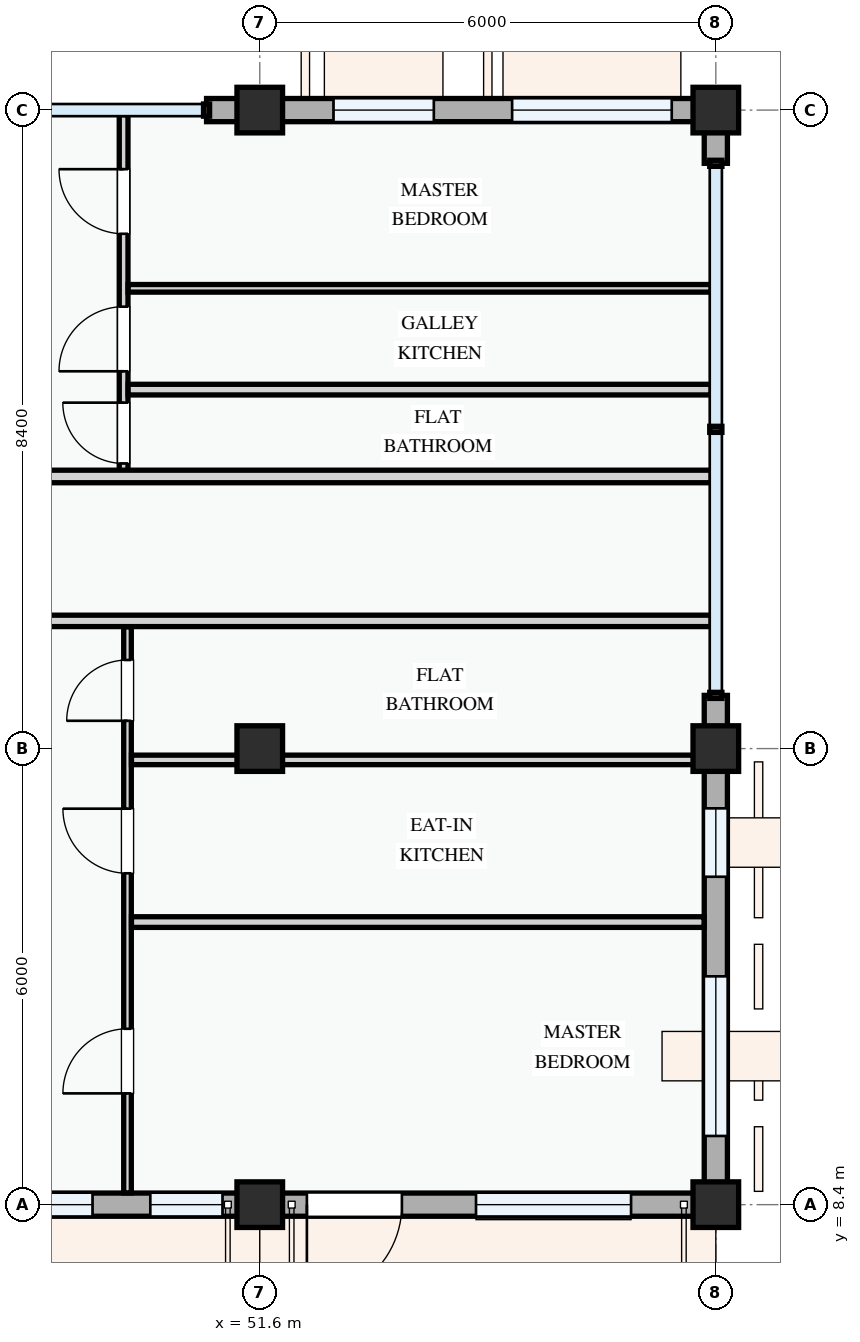
"""IFC4 building model, lengths in metres.
Left out: names, types, materials, properties, quantities, classifications, styles, units other than length and angle.
Written with IfcOpenShell. Run it as: python <this file> out.ifc"""

import sys

from ifc_helpers import new_model, si_unit, direction, frame, frame_2d, origin, origin_2d, place, context, subcontext, project, spatial, rectangle, extrude, element, fill, save


model = new_model("IFC4")
c1 = context("Model", 3, precision=1e-05, world=origin(), true_north=direction((0.0, 1.0)))
c2 = subcontext(c1, "Body", "Model", "MODEL_VIEW")
j1 = project(units=[si_unit("LENGTHUNIT", "METRE"), si_unit("PLANEANGLEUNIT", "RADIAN")], contexts=[c1])
p1 = place(None, origin())
s1 = spatial("IfcSite", under=j1, at=p1, CompositionType="ELEMENT")
p2 = place(p1, origin())
s2 = spatial("IfcBuilding", under=s1, at=p2, CompositionType="ELEMENT")
p3 = place(p2, frame((0.0, 0.0, 18.0)))
s3 = spatial("IfcBuildingStorey", under=s2, at=p3, CompositionType="ELEMENT", Elevation=18.0)
for number, where, z_axis, x_axis in (
    (1, (51.6, 8.4, 0.0), (0.0, 0.0, 1.0), (1.0, 0.0, 0.0)),
    (2, (51.6, 14.4, 0.0), (0.0, 0.0, 1.0), (1.0, 0.0, 0.0)),
    (3, (51.6, 22.8, 0.0), (0.0, 0.0, 1.0), (1.0, 0.0, 0.0)),
    (4, (57.6, 8.4, 0.0), (0.0, 0.0, 1.0), (1.0, 0.0, 0.0)),
    (5, (57.6, 14.4, 0.0), (0.0, 0.0, 1.0), (1.0, 0.0, 0.0)),
    (6, (57.6, 22.8, 0.0), (0.0, 0.0, 1.0), (1.0, 0.0, 0.0)),
):
    element("IfcColumn", number, at=place(p3, frame(where, z_axis=z_axis, x_axis=x_axis)), inside=s3, PredefinedType="COLUMN", context=c2, shape_type="SweptSolid", body=[
        extrude(rectangle(XDim=0.6, YDim=0.6, at=origin_2d()), origin(), (0.0, 0.0, 1.0), 3.3),
    ])
p4 = place(p3, frame((43.2, 8.4, 0.0), z_axis=(0.0, 0.0, 1.0), x_axis=(1.0, 0.0, 0.0)))
e7 = element("IfcWall", 7, at=p4, inside=s3, PredefinedType="STANDARD", context=c2, shape_type="SweptSolid", body=[
    extrude(rectangle(XDim=8.4, YDim=0.305, at=frame_2d((4.2, 0.0))), origin(), (0.0, 0.0, 1.0), 2.375),
])
p5 = place(p4, frame((2.11, 0.0, 0.0)))
e8 = element("IfcOpeningElement", 8, at=p5, cuts=e7, PredefinedType="OPENING", context=c2, shape_type="SweptSolid", body=[
    extrude(rectangle(XDim=1.2, YDim=2.15, at=frame_2d((0.6, 1.075))), frame((0.0, 0.163, 0.0), z_axis=(0.0, -1.0, 0.0), x_axis=(1.0, 0.0, 0.0)), (0.0, 0.0, 1.0), 0.325),
])
p6 = place(p4, frame((0.485, 0.0, 0.78)))
e9 = element("IfcOpeningElement", 9, at=p6, cuts=e7, PredefinedType="OPENING", context=c2, shape_type="SweptSolid", body=[
    extrude(rectangle(XDim=1.0, YDim=1.25, at=frame_2d((0.5, 0.625))), frame((0.0, 0.163, 0.0), z_axis=(0.0, -1.0, 0.0), x_axis=(1.0, 0.0, 0.0)), (0.0, 0.0, 1.0), 0.325),
])
p7 = place(p4, frame((3.82, 0.0, 0.78)))
e10 = element("IfcOpeningElement", 10, at=p7, cuts=e7, PredefinedType="OPENING", context=c2, shape_type="SweptSolid", body=[
    extrude(rectangle(XDim=2.38, YDim=1.48, at=frame_2d((1.19, 0.74))), frame((0.0, 0.163, 0.0), z_axis=(0.0, -1.0, 0.0), x_axis=(1.0, 0.0, 0.0)), (0.0, 0.0, 1.0), 0.325),
])
p8 = place(p4, frame((6.96, 0.0, 0.78)))
e11 = element("IfcOpeningElement", 11, at=p8, cuts=e7, PredefinedType="OPENING", context=c2, shape_type="SweptSolid", body=[
    extrude(rectangle(XDim=0.95, YDim=1.15, at=frame_2d((0.475, 0.575))), frame((0.0, 0.163, 0.0), z_axis=(0.0, -1.0, 0.0), x_axis=(1.0, 0.0, 0.0)), (0.0, 0.0, 1.0), 0.325),
])
p9 = place(p3, frame((51.6, 8.4, 0.0), z_axis=(0.0, 0.0, 1.0), x_axis=(1.0, 0.0, 0.0)))
e12 = element("IfcWall", 12, at=p9, inside=s3, PredefinedType="STANDARD", context=c2, shape_type="SweptSolid", body=[
    extrude(rectangle(XDim=6.0, YDim=0.305, at=frame_2d((3.0, 0.0))), origin(), (0.0, 0.0, 1.0), 2.475),
])
p10 = place(p9, frame((0.62, 0.0, 0.0)))
e13 = element("IfcOpeningElement", 13, at=p10, cuts=e12, PredefinedType="OPENING", context=c2, shape_type="SweptSolid", body=[
    extrude(rectangle(XDim=1.25, YDim=2.2, at=frame_2d((0.625, 1.1))), frame((0.0, 0.163, 0.0), z_axis=(0.0, -1.0, 0.0), x_axis=(1.0, 0.0, 0.0)), (0.0, 0.0, 1.0), 0.325),
])
p11 = place(p9, frame((2.845, 0.0, 0.78)))
e14 = element("IfcOpeningElement", 14, at=p11, cuts=e12, PredefinedType="OPENING", context=c2, shape_type="SweptSolid", body=[
    extrude(rectangle(XDim=2.04, YDim=1.46, at=frame_2d((1.02, 0.73))), frame((0.0, 0.163, 0.0), z_axis=(0.0, -1.0, 0.0), x_axis=(1.0, 0.0, 0.0)), (0.0, 0.0, 1.0), 0.325),
])
p12 = place(p3, frame((57.6, 8.4, 0.0), z_axis=(0.0, 0.0, 1.0), x_axis=(0.0, 1.0, 0.0)))
e15 = element("IfcWall", 15, at=p12, inside=s3, PredefinedType="STANDARD", context=c2, shape_type="SweptSolid", body=[
    extrude(rectangle(XDim=6.0, YDim=0.305, at=frame_2d((3.0, 0.0))), origin(), (0.0, 0.0, 1.0), 2.575),
])
p13 = place(p12, frame((0.904, 0.0, 0.78)))
e16 = element("IfcOpeningElement", 16, at=p13, cuts=e15, PredefinedType="OPENING", context=c2, shape_type="SweptSolid", body=[
    extrude(rectangle(XDim=2.1, YDim=1.55, at=frame_2d((1.05, 0.775))), frame((0.0, 0.163, 0.0), z_axis=(0.0, -1.0, 0.0), x_axis=(1.0, 0.0, 0.0)), (0.0, 0.0, 1.0), 0.325),
])
p14 = place(p12, frame((4.314, 0.0, 0.78)))
e17 = element("IfcOpeningElement", 17, at=p14, cuts=e15, PredefinedType="OPENING", context=c2, shape_type="SweptSolid", body=[
    extrude(rectangle(XDim=0.9, YDim=1.2, at=frame_2d((0.45, 0.6))), frame((0.0, 0.163, 0.0), z_axis=(0.0, -1.0, 0.0), x_axis=(1.0, 0.0, 0.0)), (0.0, 0.0, 1.0), 0.325),
])
p15 = place(p3, frame((57.6, 14.4, 0.0), z_axis=(0.0, 0.0, 1.0), x_axis=(0.0, 1.0, 0.0)))
e18 = element("IfcWall", 18, at=p15, inside=s3, PredefinedType="STANDARD", context=c2, shape_type="SweptSolid", body=[
    extrude(rectangle(XDim=0.7, YDim=0.305, at=frame_2d((0.35, 0.0))), origin(), (0.0, 0.0, 1.0), 2.425),
])
p16 = place(p3, frame((57.6, 22.1, 0.0), z_axis=(0.0, 0.0, 1.0), x_axis=(0.0, 1.0, 0.0)))
e19 = element("IfcWall", 19, at=p16, inside=s3, PredefinedType="STANDARD", context=c2, shape_type="SweptSolid", body=[
    extrude(rectangle(XDim=0.545, YDim=0.305, at=frame_2d((0.273, 0.0))), origin(), (0.0, 0.0, 1.0), 2.425),
])
p17 = place(p3, frame((57.6, 22.8, 0.0), z_axis=(0.0, 0.0, 1.0), x_axis=(-1.0, 0.0, 0.0)))
e20 = element("IfcWall", 20, at=p17, inside=s3, PredefinedType="STANDARD", context=c2, shape_type="SweptSolid", body=[
    extrude(rectangle(XDim=6.0, YDim=0.305, at=frame_2d((3.0, 0.0))), origin(), (0.0, 0.0, 1.0), 2.475),
])
p18 = place(p17, frame((0.58, 0.0, 0.78)))
e21 = element("IfcOpeningElement", 21, at=p18, cuts=e20, PredefinedType="OPENING", context=c2, shape_type="SweptSolid", body=[
    extrude(rectangle(XDim=2.1, YDim=1.55, at=frame_2d((1.05, 0.775))), frame((0.0, 0.163, 0.0), z_axis=(0.0, -1.0, 0.0), x_axis=(1.0, 0.0, 0.0)), (0.0, 0.0, 1.0), 0.325),
])
p19 = place(p17, frame((3.71, 0.0, 0.78)))
e22 = element("IfcOpeningElement", 22, at=p19, cuts=e20, PredefinedType="OPENING", context=c2, shape_type="SweptSolid", body=[
    extrude(rectangle(XDim=1.32, YDim=1.35, at=frame_2d((0.66, 0.675))), frame((0.0, 0.163, 0.0), z_axis=(0.0, -1.0, 0.0), x_axis=(1.0, 0.0, 0.0)), (0.0, 0.0, 1.0), 0.325),
])
p20 = place(p3, frame((51.6, 22.8, 0.0), z_axis=(0.0, 0.0, 1.0), x_axis=(-1.0, 0.0, 0.0)))
e23 = element("IfcWall", 23, at=p20, inside=s3, PredefinedType="STANDARD", context=c2, shape_type="SweptSolid", body=[
    extrude(rectangle(XDim=0.7, YDim=0.305, at=frame_2d((0.35, 0.0))), origin(), (0.0, 0.0, 1.0), 2.375),
])
p21 = place(p3, frame((49.86, 8.554, 0.0), z_axis=(0.0, 0.0, 1.0), x_axis=(0.0, 1.0, 0.0)))
e24 = element("IfcWall", 24, at=p21, inside=s3, PredefinedType="PARTITIONING", context=c2, shape_type="SweptSolid", body=[
    extrude(rectangle(XDim=7.448, YDim=0.1, at=frame_2d((3.724, 0.0))), origin(), (0.0, 0.0, 1.0), 3.0),
])
p22 = place(p21, frame((1.309, 0.0, 0.0)))
e25 = element("IfcOpeningElement", 25, at=p22, cuts=e24, PredefinedType="OPENING", context=c2, shape_type="SweptSolid", body=[
    extrude(rectangle(XDim=0.85, YDim=2.1, at=frame_2d((0.425, 1.05))), frame((0.0, 0.06, 0.0), z_axis=(0.0, -1.0, 0.0), x_axis=(1.0, 0.0, 0.0)), (0.0, 0.0, 1.0), 0.12),
])
p23 = place(p21, frame((4.205, 0.0, 0.0)))
e26 = element("IfcOpeningElement", 26, at=p23, cuts=e24, PredefinedType="OPENING", context=c2, shape_type="SweptSolid", body=[
    extrude(rectangle(XDim=0.85, YDim=2.1, at=frame_2d((0.425, 1.05))), frame((0.0, 0.06, 0.0), z_axis=(0.0, -1.0, 0.0), x_axis=(1.0, 0.0, 0.0)), (0.0, 0.0, 1.0), 0.12),
])
p24 = place(p21, frame((6.211, 0.0, 0.0)))
e27 = element("IfcOpeningElement", 27, at=p24, cuts=e24, PredefinedType="OPENING", context=c2, shape_type="SweptSolid", body=[
    extrude(rectangle(XDim=0.8, YDim=2.1, at=frame_2d((0.4, 1.05))), frame((0.0, 0.06, 0.0), z_axis=(0.0, -1.0, 0.0), x_axis=(1.0, 0.0, 0.0)), (0.0, 0.0, 1.0), 0.12),
])
p25 = place(p3, frame((49.912, 12.118, 0.0), z_axis=(0.0, 0.0, 1.0), x_axis=(1.0, 0.0, 0.0)))
e28 = element("IfcWall", 28, at=p25, inside=s3, PredefinedType="PARTITIONING", context=c2, shape_type="SweptSolid", body=[
    extrude(rectangle(XDim=7.533, YDim=0.14, at=frame_2d((3.767, 0.0))), origin(), (0.0, 0.0, 1.0), 3.0),
])
p26 = place(p3, frame((49.912, 14.251, 0.0), z_axis=(0.0, 0.0, 1.0), x_axis=(1.0, 0.0, 0.0)))
e29 = element("IfcWall", 29, at=p26, inside=s3, PredefinedType="PARTITIONING", context=c2, shape_type="SweptSolid", body=[
    extrude(rectangle(XDim=7.533, YDim=0.125, at=frame_2d((3.767, 0.0))), origin(), (0.0, 0.0, 1.0), 2.375),
])
p27 = place(p3, frame((49.809, 17.98, 0.0), z_axis=(0.0, 0.0, 1.0), x_axis=(0.0, 1.0, 0.0)))
e30 = element("IfcWall", 30, at=p27, inside=s3, PredefinedType="PARTITIONING", context=c2, shape_type="SweptSolid", body=[
    extrude(rectangle(XDim=4.76, YDim=0.115, at=frame_2d((2.38, 0.0))), origin(), (0.0, 0.0, 1.0), 3.0),
])
p28 = place(p27, frame((0.171, 0.0, 0.0)))
e31 = element("IfcOpeningElement", 31, at=p28, cuts=e30, PredefinedType="OPENING", context=c2, shape_type="SweptSolid", body=[
    extrude(rectangle(XDim=0.8, YDim=2.1, at=frame_2d((0.4, 1.05))), frame((0.0, 0.067, 0.0), z_axis=(0.0, -1.0, 0.0), x_axis=(1.0, 0.0, 0.0)), (0.0, 0.0, 1.0), 0.135),
])
p29 = place(p27, frame((1.384, 0.0, 0.0)))
e32 = element("IfcOpeningElement", 32, at=p29, cuts=e30, PredefinedType="OPENING", context=c2, shape_type="SweptSolid", body=[
    extrude(rectangle(XDim=0.85, YDim=2.1, at=frame_2d((0.425, 1.05))), frame((0.0, 0.067, 0.0), z_axis=(0.0, -1.0, 0.0), x_axis=(1.0, 0.0, 0.0)), (0.0, 0.0, 1.0), 0.135),
])
p30 = place(p27, frame((3.193, 0.0, 0.0)))
e33 = element("IfcOpeningElement", 33, at=p30, cuts=e30, PredefinedType="OPENING", context=c2, shape_type="SweptSolid", body=[
    extrude(rectangle(XDim=0.85, YDim=2.1, at=frame_2d((0.425, 1.05))), frame((0.0, 0.067, 0.0), z_axis=(0.0, -1.0, 0.0), x_axis=(1.0, 0.0, 0.0)), (0.0, 0.0, 1.0), 0.135),
])
p31 = place(p3, frame((49.868, 20.455, 0.0), z_axis=(0.0, 0.0, 1.0), x_axis=(1.0, 0.0, 0.0)))
e34 = element("IfcWall", 34, at=p31, inside=s3, PredefinedType="PARTITIONING", context=c2, shape_type="SweptSolid", body=[
    extrude(rectangle(XDim=7.672, YDim=0.1, at=frame_2d((3.836, 0.0))), origin(), (0.0, 0.0, 1.0), 3.0),
])
p32 = place(p3, frame((49.868, 19.122, 0.0), z_axis=(0.0, 0.0, 1.0), x_axis=(1.0, 0.0, 0.0)))
e35 = element("IfcWall", 35, at=p32, inside=s3, PredefinedType="PARTITIONING", context=c2, shape_type="SweptSolid", body=[
    extrude(rectangle(XDim=7.672, YDim=0.14, at=frame_2d((3.836, 0.0))), origin(), (0.0, 0.0, 1.0), 3.0),
])
p33 = place(p3, frame((22.66, 16.08, 0.0), z_axis=(0.0, 0.0, 1.0), x_axis=(1.0, 0.0, 0.0)))
e36 = element("IfcWall", 36, at=p33, inside=s3, PredefinedType="PARTITIONING", context=c2, shape_type="SweptSolid", body=[
    extrude(rectangle(XDim=34.88, YDim=0.15, at=frame_2d((17.44, 0.0))), origin(), (0.0, 0.0, 1.0), 3.0),
])
p34 = place(p33, frame((2.672, 0.0, 0.0)))
e37 = element("IfcOpeningElement", 37, at=p34, cuts=e36, PredefinedType="OPENING", context=c2, shape_type="SweptSolid", body=[
    extrude(rectangle(XDim=0.92, YDim=2.1, at=frame_2d((0.46, 1.05))), frame((0.0, 0.085, 0.0), z_axis=(0.0, -1.0, 0.0), x_axis=(1.0, 0.0, 0.0)), (0.0, 0.0, 1.0), 0.17),
])
p35 = place(p33, frame((10.71, 0.0, 0.0)))
e38 = element("IfcOpeningElement", 38, at=p35, cuts=e36, PredefinedType="OPENING", context=c2, shape_type="SweptSolid", body=[
    extrude(rectangle(XDim=0.92, YDim=2.1, at=frame_2d((0.46, 1.05))), frame((0.0, 0.085, 0.0), z_axis=(0.0, -1.0, 0.0), x_axis=(1.0, 0.0, 0.0)), (0.0, 0.0, 1.0), 0.17),
])
p36 = place(p33, frame((24.28, 0.0, 0.0)))
e39 = element("IfcOpeningElement", 39, at=p36, cuts=e36, PredefinedType="OPENING", context=c2, shape_type="SweptSolid", body=[
    extrude(rectangle(XDim=0.96, YDim=2.12, at=frame_2d((0.48, 1.06))), frame((0.0, 0.085, 0.0), z_axis=(0.0, -1.0, 0.0), x_axis=(1.0, 0.0, 0.0)), (0.0, 0.0, 1.0), 0.17),
])
p37 = place(p3, frame((22.66, 17.98, 0.0), z_axis=(0.0, 0.0, 1.0), x_axis=(1.0, 0.0, 0.0)))
e40 = element("IfcWall", 40, at=p37, inside=s3, PredefinedType="PARTITIONING", context=c2, shape_type="SweptSolid", body=[
    extrude(rectangle(XDim=34.88, YDim=0.165, at=frame_2d((17.44, 0.0))), origin(), (0.0, 0.0, 1.0), 3.0),
])
p38 = place(p37, frame((2.664, 0.0, 0.0)))
e41 = element("IfcOpeningElement", 41, at=p38, cuts=e40, PredefinedType="OPENING", context=c2, shape_type="SweptSolid", body=[
    extrude(rectangle(XDim=0.92, YDim=2.1, at=frame_2d((0.46, 1.05))), frame((0.0, 0.093, 0.0), z_axis=(0.0, -1.0, 0.0), x_axis=(1.0, 0.0, 0.0)), (0.0, 0.0, 1.0), 0.185),
])
p39 = place(p37, frame((10.71, 0.0, 0.0)))
e42 = element("IfcOpeningElement", 42, at=p39, cuts=e40, PredefinedType="OPENING", context=c2, shape_type="SweptSolid", body=[
    extrude(rectangle(XDim=0.92, YDim=2.1, at=frame_2d((0.46, 1.05))), frame((0.0, 0.093, 0.0), z_axis=(0.0, -1.0, 0.0), x_axis=(1.0, 0.0, 0.0)), (0.0, 0.0, 1.0), 0.185),
])
p40 = place(p37, frame((24.254, 0.0, 0.0)))
e43 = element("IfcOpeningElement", 43, at=p40, cuts=e40, PredefinedType="OPENING", context=c2, shape_type="SweptSolid", body=[
    extrude(rectangle(XDim=0.92, YDim=2.1, at=frame_2d((0.46, 1.05))), frame((0.0, 0.093, 0.0), z_axis=(0.0, -1.0, 0.0), x_axis=(1.0, 0.0, 0.0)), (0.0, 0.0, 1.0), 0.185),
])
p41 = place(p7, origin())
e44 = element("IfcWindow", 44, at=p41, inside=s3, PartitioningType="DOUBLE_PANEL_VERTICAL", PredefinedType="WINDOW", context=c2, shape_type="SweptSolid", body=[
    extrude(rectangle(XDim=2.38, YDim=1.48, at=frame_2d((1.19, 0.74))), frame((0.0, 0.03, 0.0), z_axis=(0.0, -1.0, 0.0), x_axis=(1.0, 0.0, 0.0)), (0.0, 0.0, 1.0), 0.06),
])
fill(e10, e44)
p42 = place(p8, origin())
e45 = element("IfcWindow", 45, at=p42, inside=s3, PartitioningType="SINGLE_PANEL", PredefinedType="WINDOW", context=c2, shape_type="SweptSolid", body=[
    extrude(rectangle(XDim=0.95, YDim=1.15, at=frame_2d((0.475, 0.575))), frame((0.0, 0.03, 0.0), z_axis=(0.0, -1.0, 0.0), x_axis=(1.0, 0.0, 0.0)), (0.0, 0.0, 1.0), 0.06),
])
fill(e11, e45)
p43 = place(p10, frame((1.25, 0.0, 0.0), z_axis=(0.0, 0.0, 1.0), x_axis=(-1.0, 0.0, 0.0)))
e46 = element("IfcDoor", 46, at=p43, inside=s3, OperationType="SINGLE_SWING_RIGHT", PredefinedType="DOOR", context=c2, shape_type="SweptSolid", body=[
    extrude(rectangle(XDim=1.25, YDim=2.2, at=frame_2d((0.625, 1.1))), frame((0.0, 0.025, 0.0), z_axis=(0.0, -1.0, 0.0), x_axis=(1.0, 0.0, 0.0)), (0.0, 0.0, 1.0), 0.05),
])
fill(e13, e46)
p44 = place(p11, origin())
e47 = element("IfcWindow", 47, at=p44, inside=s3, PartitioningType="DOUBLE_PANEL_VERTICAL", PredefinedType="WINDOW", context=c2, shape_type="SweptSolid", body=[
    extrude(rectangle(XDim=2.04, YDim=1.46, at=frame_2d((1.02, 0.73))), frame((0.0, 0.03, 0.0), z_axis=(0.0, -1.0, 0.0), x_axis=(1.0, 0.0, 0.0)), (0.0, 0.0, 1.0), 0.06),
])
fill(e14, e47)
p45 = place(p13, origin())
e48 = element("IfcWindow", 48, at=p45, inside=s3, PartitioningType="DOUBLE_PANEL_VERTICAL", PredefinedType="WINDOW", context=c2, shape_type="SweptSolid", body=[
    extrude(rectangle(XDim=2.1, YDim=1.55, at=frame_2d((1.05, 0.775))), frame((0.0, 0.03, 0.0), z_axis=(0.0, -1.0, 0.0), x_axis=(1.0, 0.0, 0.0)), (0.0, 0.0, 1.0), 0.06),
])
fill(e16, e48)
p46 = place(p14, origin())
e49 = element("IfcWindow", 49, at=p46, inside=s3, PartitioningType="SINGLE_PANEL", PredefinedType="WINDOW", context=c2, shape_type="SweptSolid", body=[
    extrude(rectangle(XDim=0.9, YDim=1.2, at=frame_2d((0.45, 0.6))), frame((0.0, 0.03, 0.0), z_axis=(0.0, -1.0, 0.0), x_axis=(1.0, 0.0, 0.0)), (0.0, 0.0, 1.0), 0.06),
])
fill(e17, e49)
p47 = place(p18, origin())
e50 = element("IfcWindow", 50, at=p47, inside=s3, PartitioningType="DOUBLE_PANEL_VERTICAL", PredefinedType="WINDOW", context=c2, shape_type="SweptSolid", body=[
    extrude(rectangle(XDim=2.1, YDim=1.55, at=frame_2d((1.05, 0.775))), frame((0.0, 0.03, 0.0), z_axis=(0.0, -1.0, 0.0), x_axis=(1.0, 0.0, 0.0)), (0.0, 0.0, 1.0), 0.06),
])
fill(e21, e50)
p48 = place(p19, origin())
e51 = element("IfcWindow", 51, at=p48, inside=s3, PartitioningType="SINGLE_PANEL", PredefinedType="WINDOW", context=c2, shape_type="SweptSolid", body=[
    extrude(rectangle(XDim=1.32, YDim=1.35, at=frame_2d((0.66, 0.675))), frame((0.0, 0.03, 0.0), z_axis=(0.0, -1.0, 0.0), x_axis=(1.0, 0.0, 0.0)), (0.0, 0.0, 1.0), 0.06),
])
fill(e22, e51)
p49 = place(p22, origin())
e52 = element("IfcDoor", 52, at=p49, inside=s3, OperationType="SINGLE_SWING_LEFT", PredefinedType="DOOR", context=c2, shape_type="SweptSolid", body=[
    extrude(rectangle(XDim=0.85, YDim=2.1, at=frame_2d((0.425, 1.05))), frame((0.0, 0.025, 0.0), z_axis=(0.0, -1.0, 0.0), x_axis=(1.0, 0.0, 0.0)), (0.0, 0.0, 1.0), 0.05),
])
fill(e25, e52)
p50 = place(p23, origin())
e53 = element("IfcDoor", 53, at=p50, inside=s3, OperationType="SINGLE_SWING_RIGHT", PredefinedType="DOOR", context=c2, shape_type="SweptSolid", body=[
    extrude(rectangle(XDim=0.85, YDim=2.1, at=frame_2d((0.425, 1.05))), frame((0.0, 0.025, 0.0), z_axis=(0.0, -1.0, 0.0), x_axis=(1.0, 0.0, 0.0)), (0.0, 0.0, 1.0), 0.05),
])
fill(e26, e53)
p51 = place(p24, origin())
e54 = element("IfcDoor", 54, at=p51, inside=s3, OperationType="SINGLE_SWING_LEFT", PredefinedType="DOOR", context=c2, shape_type="SweptSolid", body=[
    extrude(rectangle(XDim=0.8, YDim=2.1, at=frame_2d((0.4, 1.05))), frame((0.0, 0.025, 0.0), z_axis=(0.0, -1.0, 0.0), x_axis=(1.0, 0.0, 0.0)), (0.0, 0.0, 1.0), 0.05),
])
fill(e27, e54)
p52 = place(p28, origin())
e55 = element("IfcDoor", 55, at=p52, inside=s3, OperationType="SINGLE_SWING_RIGHT", PredefinedType="DOOR", context=c2, shape_type="SweptSolid", body=[
    extrude(rectangle(XDim=0.8, YDim=2.1, at=frame_2d((0.4, 1.05))), frame((0.0, 0.025, 0.0), z_axis=(0.0, -1.0, 0.0), x_axis=(1.0, 0.0, 0.0)), (0.0, 0.0, 1.0), 0.05),
])
fill(e31, e55)
p53 = place(p29, origin())
e56 = element("IfcDoor", 56, at=p53, inside=s3, OperationType="SINGLE_SWING_LEFT", PredefinedType="DOOR", context=c2, shape_type="SweptSolid", body=[
    extrude(rectangle(XDim=0.85, YDim=2.1, at=frame_2d((0.425, 1.05))), frame((0.0, 0.025, 0.0), z_axis=(0.0, -1.0, 0.0), x_axis=(1.0, 0.0, 0.0)), (0.0, 0.0, 1.0), 0.05),
])
fill(e32, e56)
p54 = place(p30, origin())
e57 = element("IfcDoor", 57, at=p54, inside=s3, OperationType="SINGLE_SWING_RIGHT", PredefinedType="DOOR", context=c2, shape_type="SweptSolid", body=[
    extrude(rectangle(XDim=0.85, YDim=2.1, at=frame_2d((0.425, 1.05))), frame((0.0, 0.025, 0.0), z_axis=(0.0, -1.0, 0.0), x_axis=(1.0, 0.0, 0.0)), (0.0, 0.0, 1.0), 0.05),
])
fill(e33, e57)
save(model, sys.argv[1])
